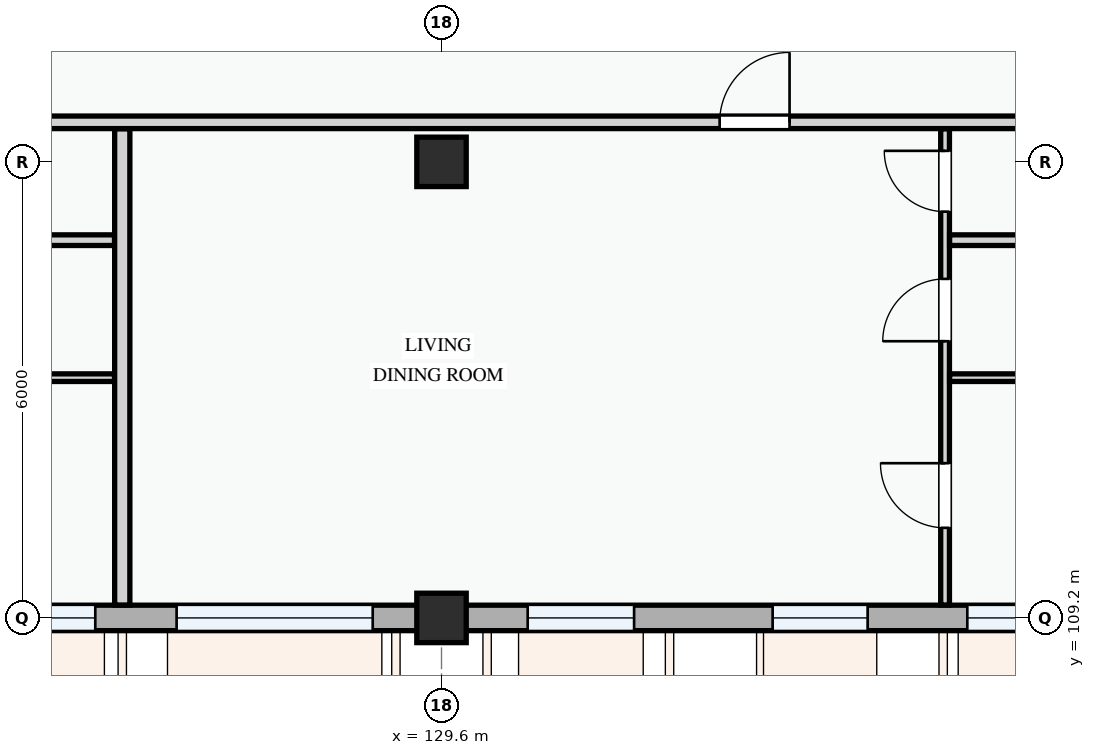
"""IFC4 building model, lengths in metres.
Left out: names, types, materials, properties, quantities, classifications, styles, units other than length and angle.
Written with IfcOpenShell. Run it as: python <this file> out.ifc"""

import sys

from ifc_helpers import new_model, si_unit, direction, frame, frame_2d, origin, origin_2d, place, context, subcontext, project, spatial, rectangle, extrude, element, fill, save


model = new_model("IFC4")
c1 = context("Model", 3, precision=1e-05, world=origin(), true_north=direction((0.0, 1.0)))
c2 = subcontext(c1, "Body", "Model", "MODEL_VIEW")
j1 = project(units=[si_unit("LENGTHUNIT", "METRE"), si_unit("PLANEANGLEUNIT", "RADIAN")], contexts=[c1])
p1 = place(None, origin())
s1 = spatial("IfcSite", under=j1, at=p1, CompositionType="ELEMENT")
p2 = place(p1, origin())
s2 = spatial("IfcBuilding", under=s1, at=p2, CompositionType="ELEMENT")
p3 = place(p2, frame((0.0, 0.0, 14.7)))
s3 = spatial("IfcBuildingStorey", under=s2, at=p3, CompositionType="ELEMENT", Elevation=14.7)
for number, where, z_axis, x_axis in (
    (1, (129.6, 109.2, 0.0), (0.0, 0.0, 1.0), (1.0, 0.0, 0.0)),
    (2, (129.6, 115.2, 0.0), (0.0, 0.0, 1.0), (1.0, 0.0, 0.0)),
):
    element("IfcColumn", number, at=place(p3, frame(where, z_axis=z_axis, x_axis=x_axis)), inside=s3, PredefinedType="COLUMN", context=c2, shape_type="SweptSolid", body=[
        extrude(rectangle(XDim=0.65, YDim=0.65, at=origin_2d()), origin(), (0.0, 0.0, 1.0), 3.3),
    ])
p4 = place(p3, frame((123.6, 109.2, 0.0), z_axis=(0.0, 0.0, 1.0), x_axis=(1.0, 0.0, 0.0)))
e3 = element("IfcWall", 3, at=p4, inside=s3, PredefinedType="STANDARD", context=c2, shape_type="SweptSolid", body=[
    extrude(rectangle(XDim=6.0, YDim=0.335, at=frame_2d((3.0, 0.0))), origin(), (0.0, 0.0, 1.0), 2.475),
])
p5 = place(p4, frame((0.545, 0.0, 0.78)))
e4 = element("IfcOpeningElement", 4, at=p5, cuts=e3, PredefinedType="OPENING", context=c2, shape_type="SweptSolid", body=[
    extrude(rectangle(XDim=0.9, YDim=1.2, at=frame_2d((0.45, 0.6))), frame((0.0, 0.177, 0.0), z_axis=(0.0, -1.0, 0.0), x_axis=(1.0, 0.0, 0.0)), (0.0, 0.0, 1.0), 0.355),
])
p6 = place(p4, frame((2.515, 0.0, 0.78)))
e5 = element("IfcOpeningElement", 5, at=p6, cuts=e3, PredefinedType="OPENING", context=c2, shape_type="SweptSolid", body=[
    extrude(rectangle(XDim=2.58, YDim=1.48, at=frame_2d((1.29, 0.74))), frame((0.0, 0.177, 0.0), z_axis=(0.0, -1.0, 0.0), x_axis=(1.0, 0.0, 0.0)), (0.0, 0.0, 1.0), 0.355),
])
p7 = place(p3, frame((129.6, 109.2, 0.0), z_axis=(0.0, 0.0, 1.0), x_axis=(1.0, 0.0, 0.0)))
e6 = element("IfcWall", 6, at=p7, inside=s3, PredefinedType="STANDARD", context=c2, shape_type="SweptSolid", body=[
    extrude(rectangle(XDim=8.4, YDim=0.335, at=frame_2d((4.2, 0.0))), origin(), (0.0, 0.0, 1.0), 2.375),
])
p8 = place(p7, frame((1.134, 0.0, 0.78)))
e7 = element("IfcOpeningElement", 7, at=p8, cuts=e6, PredefinedType="OPENING", context=c2, shape_type="SweptSolid", body=[
    extrude(rectangle(XDim=1.4, YDim=1.45, at=frame_2d((0.7, 0.725))), frame((0.0, 0.177, 0.0), z_axis=(0.0, -1.0, 0.0), x_axis=(1.0, 0.0, 0.0)), (0.0, 0.0, 1.0), 0.355),
])
p9 = place(p7, frame((4.356, 0.0, 0.78)))
e8 = element("IfcOpeningElement", 8, at=p9, cuts=e6, PredefinedType="OPENING", context=c2, shape_type="SweptSolid", body=[
    extrude(rectangle(XDim=1.25, YDim=1.45, at=frame_2d((0.625, 0.725))), frame((0.0, 0.177, 0.0), z_axis=(0.0, -1.0, 0.0), x_axis=(1.0, 0.0, 0.0)), (0.0, 0.0, 1.0), 0.355),
])
p10 = place(p7, frame((6.917, 0.0, 0.78)))
e9 = element("IfcOpeningElement", 9, at=p10, cuts=e6, PredefinedType="OPENING", context=c2, shape_type="SweptSolid", body=[
    extrude(rectangle(XDim=1.0, YDim=1.25, at=frame_2d((0.5, 0.625))), frame((0.0, 0.177, 0.0), z_axis=(0.0, -1.0, 0.0), x_axis=(1.0, 0.0, 0.0)), (0.0, 0.0, 1.0), 0.355),
])
p11 = place(p3, frame((113.53, 112.361, 0.0), z_axis=(0.0, 0.0, 1.0), x_axis=(1.0, 0.0, 0.0)))
e10 = element("IfcWall", 10, at=p11, inside=s3, PredefinedType="PARTITIONING", context=c2, shape_type="SweptSolid", body=[
    extrude(rectangle(XDim=11.769, YDim=0.1, at=frame_2d((5.884, 0.0))), origin(), (0.0, 0.0, 1.0), 3.0),
])
p12 = place(p3, frame((113.53, 114.17, 0.0), z_axis=(0.0, 0.0, 1.0), x_axis=(1.0, 0.0, 0.0)))
e11 = element("IfcWall", 11, at=p12, inside=s3, PredefinedType="PARTITIONING", context=c2, shape_type="SweptSolid", body=[
    extrude(rectangle(XDim=11.769, YDim=0.14, at=frame_2d((5.884, 0.0))), origin(), (0.0, 0.0, 1.0), 3.0),
])
p13 = place(p3, frame((136.225, 109.369, 0.0), z_axis=(0.0, 0.0, 1.0), x_axis=(0.0, 1.0, 0.0)))
e12 = element("IfcWall", 12, at=p13, inside=s3, PredefinedType="PARTITIONING", context=c2, shape_type="SweptSolid", body=[
    extrude(rectangle(XDim=6.266, YDim=0.115, at=frame_2d((3.133, 0.0))), origin(), (0.0, 0.0, 1.0), 3.0),
])
p14 = place(p13, frame((1.016, 0.0, 0.0)))
e13 = element("IfcOpeningElement", 13, at=p14, cuts=e12, PredefinedType="OPENING", context=c2, shape_type="SweptSolid", body=[
    extrude(rectangle(XDim=0.85, YDim=2.1, at=frame_2d((0.425, 1.05))), frame((0.0, 0.067, 0.0), z_axis=(0.0, -1.0, 0.0), x_axis=(1.0, 0.0, 0.0)), (0.0, 0.0, 1.0), 0.135),
])
p15 = place(p13, frame((3.471, 0.0, 0.0)))
e14 = element("IfcOpeningElement", 14, at=p15, cuts=e12, PredefinedType="OPENING", context=c2, shape_type="SweptSolid", body=[
    extrude(rectangle(XDim=0.82, YDim=2.08, at=frame_2d((0.41, 1.04))), frame((0.0, 0.067, 0.0), z_axis=(0.0, -1.0, 0.0), x_axis=(1.0, 0.0, 0.0)), (0.0, 0.0, 1.0), 0.135),
])
p16 = place(p13, frame((5.175, 0.0, 0.0)))
e15 = element("IfcOpeningElement", 15, at=p16, cuts=e12, PredefinedType="OPENING", context=c2, shape_type="SweptSolid", body=[
    extrude(rectangle(XDim=0.8, YDim=2.1, at=frame_2d((0.4, 1.05))), frame((0.0, 0.067, 0.0), z_axis=(0.0, -1.0, 0.0), x_axis=(1.0, 0.0, 0.0)), (0.0, 0.0, 1.0), 0.135),
])
p17 = place(p3, frame((136.284, 112.361, 0.0), z_axis=(0.0, 0.0, 1.0), x_axis=(1.0, 0.0, 0.0)))
e16 = element("IfcWall", 16, at=p17, inside=s3, PredefinedType="PARTITIONING", context=c2, shape_type="SweptSolid", body=[
    extrude(rectangle(XDim=13.681, YDim=0.1, at=frame_2d((6.841, 0.0))), origin(), (0.0, 0.0, 1.0), 3.0),
])
p18 = place(p3, frame((136.284, 114.17, 0.0), z_axis=(0.0, 0.0, 1.0), x_axis=(1.0, 0.0, 0.0)))
e17 = element("IfcWall", 17, at=p18, inside=s3, PredefinedType="PARTITIONING", context=c2, shape_type="SweptSolid", body=[
    extrude(rectangle(XDim=13.681, YDim=0.14, at=frame_2d((6.841, 0.0))), origin(), (0.0, 0.0, 1.0), 3.0),
])
p19 = place(p3, frame((125.4, 109.369, 0.0), z_axis=(0.0, 0.0, 1.0), x_axis=(0.0, 1.0, 0.0)))
e18 = element("IfcWall", 18, at=p19, inside=s3, PredefinedType="PARTITIONING", context=c2, shape_type="SweptSolid", body=[
    extrude(rectangle(XDim=6.266, YDim=0.2, at=frame_2d((3.133, 0.0))), origin(), (0.0, 0.0, 1.0), 3.0),
])
p20 = place(p3, frame((80.57, 115.72, 0.0), z_axis=(0.0, 0.0, 1.0), x_axis=(1.0, 0.0, 0.0)))
e19 = element("IfcWall", 19, at=p20, inside=s3, PredefinedType="PARTITIONING", context=c2, shape_type="SweptSolid", body=[
    extrude(rectangle(XDim=69.48, YDim=0.165, at=frame_2d((34.74, 0.0))), origin(), (0.0, 0.0, 1.0), 3.0),
])
p21 = place(p20, frame((9.421, 0.0, 0.0)))
e20 = element("IfcOpeningElement", 20, at=p21, cuts=e19, PredefinedType="OPENING", context=c2, shape_type="SweptSolid", body=[
    extrude(rectangle(XDim=0.92, YDim=2.1, at=frame_2d((0.46, 1.05))), frame((0.0, 0.093, 0.0), z_axis=(0.0, -1.0, 0.0), x_axis=(1.0, 0.0, 0.0)), (0.0, 0.0, 1.0), 0.185),
])
p22 = place(p20, frame((23.996, 0.0, 0.0)))
e21 = element("IfcOpeningElement", 21, at=p22, cuts=e19, PredefinedType="OPENING", context=c2, shape_type="SweptSolid", body=[
    extrude(rectangle(XDim=0.92, YDim=2.1, at=frame_2d((0.46, 1.05))), frame((0.0, 0.093, 0.0), z_axis=(0.0, -1.0, 0.0), x_axis=(1.0, 0.0, 0.0)), (0.0, 0.0, 1.0), 0.185),
])
p23 = place(p20, frame((52.69, 0.0, 0.0)))
e22 = element("IfcOpeningElement", 22, at=p23, cuts=e19, PredefinedType="OPENING", context=c2, shape_type="SweptSolid", body=[
    extrude(rectangle(XDim=0.92, YDim=2.1, at=frame_2d((0.46, 1.05))), frame((0.0, 0.093, 0.0), z_axis=(0.0, -1.0, 0.0), x_axis=(1.0, 0.0, 0.0)), (0.0, 0.0, 1.0), 0.185),
])
p24 = place(p5, origin())
e23 = element("IfcWindow", 23, at=p24, inside=s3, PartitioningType="SINGLE_PANEL", PredefinedType="WINDOW", context=c2, shape_type="SweptSolid", body=[
    extrude(rectangle(XDim=0.9, YDim=1.2, at=frame_2d((0.45, 0.6))), frame((0.0, 0.03, 0.0), z_axis=(0.0, -1.0, 0.0), x_axis=(1.0, 0.0, 0.0)), (0.0, 0.0, 1.0), 0.06),
])
fill(e4, e23)
p25 = place(p6, origin())
e24 = element("IfcWindow", 24, at=p25, inside=s3, PartitioningType="DOUBLE_PANEL_VERTICAL", PredefinedType="WINDOW", context=c2, shape_type="SweptSolid", body=[
    extrude(rectangle(XDim=2.58, YDim=1.48, at=frame_2d((1.29, 0.74))), frame((0.0, 0.03, 0.0), z_axis=(0.0, -1.0, 0.0), x_axis=(1.0, 0.0, 0.0)), (0.0, 0.0, 1.0), 0.06),
])
fill(e5, e24)
p26 = place(p8, origin())
e25 = element("IfcWindow", 25, at=p26, inside=s3, PartitioningType="SINGLE_PANEL", PredefinedType="WINDOW", context=c2, shape_type="SweptSolid", body=[
    extrude(rectangle(XDim=1.4, YDim=1.45, at=frame_2d((0.7, 0.725))), frame((0.0, 0.03, 0.0), z_axis=(0.0, -1.0, 0.0), x_axis=(1.0, 0.0, 0.0)), (0.0, 0.0, 1.0), 0.06),
])
fill(e7, e25)
p27 = place(p9, origin())
e26 = element("IfcWindow", 26, at=p27, inside=s3, PartitioningType="SINGLE_PANEL", PredefinedType="WINDOW", context=c2, shape_type="SweptSolid", body=[
    extrude(rectangle(XDim=1.25, YDim=1.45, at=frame_2d((0.625, 0.725))), frame((0.0, 0.03, 0.0), z_axis=(0.0, -1.0, 0.0), x_axis=(1.0, 0.0, 0.0)), (0.0, 0.0, 1.0), 0.06),
])
fill(e8, e26)
p28 = place(p10, origin())
e27 = element("IfcWindow", 27, at=p28, inside=s3, PartitioningType="SINGLE_PANEL", PredefinedType="WINDOW", context=c2, shape_type="SweptSolid", body=[
    extrude(rectangle(XDim=1.0, YDim=1.25, at=frame_2d((0.5, 0.625))), frame((0.0, 0.03, 0.0), z_axis=(0.0, -1.0, 0.0), x_axis=(1.0, 0.0, 0.0)), (0.0, 0.0, 1.0), 0.06),
])
fill(e9, e27)
p29 = place(p14, origin())
e28 = element("IfcDoor", 28, at=p29, inside=s3, OperationType="SINGLE_SWING_RIGHT", PredefinedType="DOOR", context=c2, shape_type="SweptSolid", body=[
    extrude(rectangle(XDim=0.85, YDim=2.1, at=frame_2d((0.425, 1.05))), frame((0.0, 0.025, 0.0), z_axis=(0.0, -1.0, 0.0), x_axis=(1.0, 0.0, 0.0)), (0.0, 0.0, 1.0), 0.05),
])
fill(e13, e28)
p30 = place(p15, origin())
e29 = element("IfcDoor", 29, at=p30, inside=s3, OperationType="SINGLE_SWING_LEFT", PredefinedType="DOOR", context=c2, shape_type="SweptSolid", body=[
    extrude(rectangle(XDim=0.82, YDim=2.08, at=frame_2d((0.41, 1.04))), frame((0.0, 0.025, 0.0), z_axis=(0.0, -1.0, 0.0), x_axis=(1.0, 0.0, 0.0)), (0.0, 0.0, 1.0), 0.05),
])
fill(e14, e29)
p31 = place(p16, origin())
e30 = element("IfcDoor", 30, at=p31, inside=s3, OperationType="SINGLE_SWING_RIGHT", PredefinedType="DOOR", context=c2, shape_type="SweptSolid", body=[
    extrude(rectangle(XDim=0.8, YDim=2.1, at=frame_2d((0.4, 1.05))), frame((0.0, 0.025, 0.0), z_axis=(0.0, -1.0, 0.0), x_axis=(1.0, 0.0, 0.0)), (0.0, 0.0, 1.0), 0.05),
])
fill(e15, e30)
p32 = place(p23, origin())
e31 = element("IfcDoor", 31, at=p32, inside=s3, OperationType="SINGLE_SWING_RIGHT", PredefinedType="DOOR", context=c2, shape_type="SweptSolid", body=[
    extrude(rectangle(XDim=0.92, YDim=2.1, at=frame_2d((0.46, 1.05))), frame((0.0, 0.025, 0.0), z_axis=(0.0, -1.0, 0.0), x_axis=(1.0, 0.0, 0.0)), (0.0, 0.0, 1.0), 0.05),
])
fill(e22, e31)
save(model, sys.argv[1])
